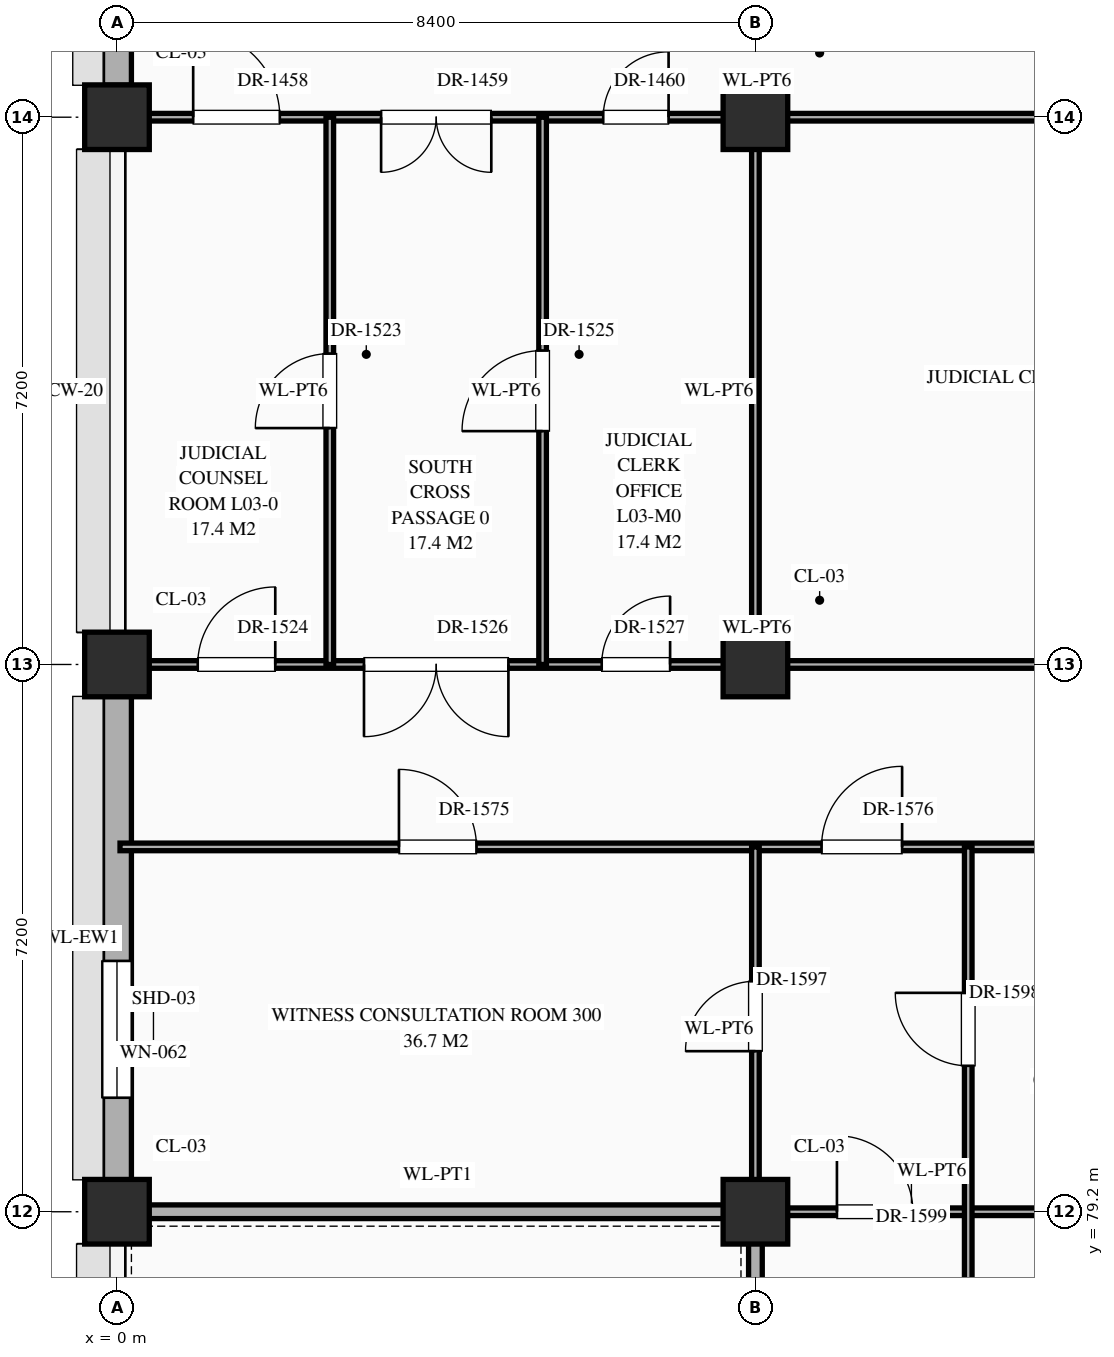
"""IFC4 building model, lengths in metres.
Left out: names, types, materials, properties, quantities, classifications, styles, units other than length and angle.
Written with IfcOpenShell. Run it as: python <this file> out.ifc"""

import sys

from ifc_helpers import new_model, si_unit, direction, frame, frame_2d, origin, origin_2d, place, context, subcontext, project, spatial, rectangle, extrude, element, fill, save


model = new_model("IFC4")
c1 = context("Model", 3, precision=1e-05, world=origin(), true_north=direction((0.0, 1.0)))
c2 = subcontext(c1, "Body", "Model", "MODEL_VIEW")
j1 = project(units=[si_unit("LENGTHUNIT", "METRE"), si_unit("PLANEANGLEUNIT", "RADIAN")], contexts=[c1])
p1 = place(None, origin())
s1 = spatial("IfcSite", under=j1, at=p1, CompositionType="ELEMENT")
p2 = place(p1, origin())
s2 = spatial("IfcBuilding", under=s1, at=p2, CompositionType="ELEMENT")
p3 = place(p2, frame((0.0, 0.0, 10.8)))
s3 = spatial("IfcBuildingStorey", under=s2, at=p3, CompositionType="ELEMENT", Elevation=10.8)
for number, where, z_axis, x_axis in (
    (1, (0.0, 79.2, 0.0), (0.0, 0.0, 1.0), (1.0, 0.0, 0.0)),
    (2, (0.0, 86.4, 0.0), (0.0, 0.0, 1.0), (1.0, 0.0, 0.0)),
    (3, (0.0, 93.6, 0.0), (0.0, 0.0, 1.0), (1.0, 0.0, 0.0)),
    (4, (8.4, 79.2, 0.0), (0.0, 0.0, 1.0), (1.0, 0.0, 0.0)),
    (5, (8.4, 86.4, 0.0), (0.0, 0.0, 1.0), (1.0, 0.0, 0.0)),
    (6, (8.4, 93.6, 0.0), (0.0, 0.0, 1.0), (1.0, 0.0, 0.0)),
):
    element("IfcColumn", number, at=place(p3, frame(where, z_axis=z_axis, x_axis=x_axis)), inside=s3, PredefinedType="COLUMN", context=c2, shape_type="SweptSolid", body=[
        extrude(rectangle(XDim=0.85, YDim=0.85, at=origin_2d()), origin(), (0.0, 0.0, 1.0), 5.4),
    ])
p4 = place(p3, frame((0.0, 79.62, 0.0), z_axis=(0.0, 0.0, 1.0), x_axis=(0.0, 1.0, 0.0)))
e7 = element("IfcWall", 7, at=p4, inside=s3, PredefinedType="STANDARD", context=c2, shape_type="SweptSolid", body=[
    extrude(rectangle(XDim=6.36, YDim=0.38, at=frame_2d((3.18, 0.0))), origin(), (0.0, 0.0, 1.0), 4.47),
])
p5 = place(p4, frame((1.08, 0.0, 0.85)))
e8 = element("IfcOpeningElement", 8, at=p5, cuts=e7, PredefinedType="OPENING", context=c2, shape_type="SweptSolid", body=[
    extrude(rectangle(XDim=1.8, YDim=1.2, at=frame_2d((0.9, 0.6))), frame((0.0, 0.202, 0.0), z_axis=(0.0, -1.0, 0.0), x_axis=(1.0, 0.0, 0.0)), (0.0, 0.0, 1.0), 0.404),
])
p6 = place(p3, frame((0.0, 94.02, 0.0), z_axis=(0.0, 0.0, 1.0), x_axis=(0.0, 1.0, 0.0)))
e9 = element("IfcWall", 9, at=p6, inside=s3, PredefinedType="STANDARD", context=c2, shape_type="SweptSolid", body=[
    extrude(rectangle(XDim=6.36, YDim=0.38, at=frame_2d((3.18, 0.0))), origin(), (0.0, 0.0, 1.0), 4.47),
])
p7 = place(p6, frame((4.03, 0.0, 0.85)))
e10 = element("IfcOpeningElement", 10, at=p7, cuts=e9, PredefinedType="OPENING", context=c2, shape_type="SweptSolid", body=[
    extrude(rectangle(XDim=0.9, YDim=1.56, at=frame_2d((0.45, 0.78))), frame((0.0, 0.202, 0.0), z_axis=(0.0, -1.0, 0.0), x_axis=(1.0, 0.0, 0.0)), (0.0, 0.0, 1.0), 0.404),
])
p8 = place(p3, frame((0.04, 79.2, 0.0), z_axis=(0.0, 0.0, 1.0), x_axis=(1.0, 0.0, 0.0)))
e11 = element("IfcWall", 11, at=p8, inside=s3, PredefinedType="STANDARD", context=c2, shape_type="SweptSolid", body=[
    extrude(rectangle(XDim=8.36, YDim=0.18, at=frame_2d((4.18, 0.0))), origin(), (0.0, 0.0, 1.0), 4.27),
])
p9 = place(p3, frame((8.4, 79.2, 0.0), z_axis=(0.0, 0.0, 1.0), x_axis=(1.0, 0.0, 0.0)))
e12 = element("IfcWall", 12, at=p9, inside=s3, PredefinedType="STANDARD", context=c2, shape_type="SweptSolid", body=[
    extrude(rectangle(XDim=8.36, YDim=0.1, at=frame_2d((4.18, 0.0))), origin(), (0.0, 0.0, 1.0), 4.27),
])
p10 = place(p9, frame((1.073, 0.0, 0.0)))
e13 = element("IfcOpeningElement", 13, at=p10, cuts=e12, PredefinedType="OPENING", context=c2, shape_type="SweptSolid", body=[
    extrude(rectangle(XDim=1.0, YDim=2.25, at=frame_2d((0.5, 1.125))), frame((0.0, 0.062, 0.0), z_axis=(0.0, -1.0, 0.0), x_axis=(1.0, 0.0, 0.0)), (0.0, 0.0, 1.0), 0.124),
])
p11 = place(p3, frame((0.04, 84.0, 0.0), z_axis=(0.0, 0.0, 1.0), x_axis=(1.0, 0.0, 0.0)))
e14 = element("IfcWall", 14, at=p11, inside=s3, PredefinedType="STANDARD", context=c2, shape_type="SweptSolid", body=[
    extrude(rectangle(XDim=33.56, YDim=0.1, at=frame_2d((16.78, 0.0))), origin(), (0.0, 0.0, 1.0), 5.12),
])
p12 = place(p11, frame((3.67, 0.0, 0.0)))
e15 = element("IfcOpeningElement", 15, at=p12, cuts=e14, PredefinedType="OPENING", context=c2, shape_type="SweptSolid", body=[
    extrude(rectangle(XDim=1.02, YDim=2.4, at=frame_2d((0.51, 1.2))), frame((0.0, 0.062, 0.0), z_axis=(0.0, -1.0, 0.0), x_axis=(1.0, 0.0, 0.0)), (0.0, 0.0, 1.0), 0.124),
])
p13 = place(p11, frame((9.23, 0.0, 0.0)))
e16 = element("IfcOpeningElement", 16, at=p13, cuts=e14, PredefinedType="OPENING", context=c2, shape_type="SweptSolid", body=[
    extrude(rectangle(XDim=1.06, YDim=2.4, at=frame_2d((0.53, 1.2))), frame((0.0, 0.062, 0.0), z_axis=(0.0, -1.0, 0.0), x_axis=(1.0, 0.0, 0.0)), (0.0, 0.0, 1.0), 0.124),
])
p14 = place(p11, frame((13.39, 0.0, 0.0)))
e17 = element("IfcOpeningElement", 17, at=p14, cuts=e14, PredefinedType="OPENING", context=c2, shape_type="SweptSolid", body=[
    extrude(rectangle(XDim=1.14, YDim=2.4, at=frame_2d((0.57, 1.2))), frame((0.0, 0.062, 0.0), z_axis=(0.0, -1.0, 0.0), x_axis=(1.0, 0.0, 0.0)), (0.0, 0.0, 1.0), 0.124),
])
p15 = place(p11, frame((20.51, 0.0, 0.0)))
e18 = element("IfcOpeningElement", 18, at=p15, cuts=e14, PredefinedType="OPENING", context=c2, shape_type="SweptSolid", body=[
    extrude(rectangle(XDim=0.9, YDim=2.15, at=frame_2d((0.45, 1.075))), frame((0.0, 0.062, 0.0), z_axis=(0.0, -1.0, 0.0), x_axis=(1.0, 0.0, 0.0)), (0.0, 0.0, 1.0), 0.124),
])
p16 = place(p11, frame((28.93, 0.0, 0.0)))
e19 = element("IfcOpeningElement", 19, at=p16, cuts=e14, PredefinedType="OPENING", context=c2, shape_type="SweptSolid", body=[
    extrude(rectangle(XDim=0.86, YDim=2.1, at=frame_2d((0.43, 1.05))), frame((0.0, 0.062, 0.0), z_axis=(0.0, -1.0, 0.0), x_axis=(1.0, 0.0, 0.0)), (0.0, 0.0, 1.0), 0.124),
])
p17 = place(p3, frame((0.04, 86.4, 0.0), z_axis=(0.0, 0.0, 1.0), x_axis=(1.0, 0.0, 0.0)))
e20 = element("IfcWall", 20, at=p17, inside=s3, PredefinedType="STANDARD", context=c2, shape_type="SweptSolid", body=[
    extrude(rectangle(XDim=16.76, YDim=0.1, at=frame_2d((8.38, 0.0))), origin(), (0.0, 0.0, 1.0), 4.27),
])
p18 = place(p17, frame((1.022, 0.0, 0.0)))
e21 = element("IfcOpeningElement", 21, at=p18, cuts=e20, PredefinedType="OPENING", context=c2, shape_type="SweptSolid", body=[
    extrude(rectangle(XDim=1.02, YDim=2.4, at=frame_2d((0.51, 1.2))), frame((0.0, 0.062, 0.0), z_axis=(0.0, -1.0, 0.0), x_axis=(1.0, 0.0, 0.0)), (0.0, 0.0, 1.0), 0.124),
])
p19 = place(p17, frame((3.21, 0.0, 0.0)))
e22 = element("IfcOpeningElement", 22, at=p19, cuts=e20, PredefinedType="OPENING", context=c2, shape_type="SweptSolid", body=[
    extrude(rectangle(XDim=1.9, YDim=2.5, at=frame_2d((0.95, 1.25))), frame((0.0, 0.062, 0.0), z_axis=(0.0, -1.0, 0.0), x_axis=(1.0, 0.0, 0.0)), (0.0, 0.0, 1.0), 0.124),
])
p20 = place(p17, frame((6.337, 0.0, 0.0)))
e23 = element("IfcOpeningElement", 23, at=p20, cuts=e20, PredefinedType="OPENING", context=c2, shape_type="SweptSolid", body=[
    extrude(rectangle(XDim=0.9, YDim=2.15, at=frame_2d((0.45, 1.075))), frame((0.0, 0.062, 0.0), z_axis=(0.0, -1.0, 0.0), x_axis=(1.0, 0.0, 0.0)), (0.0, 0.0, 1.0), 0.124),
])
p21 = place(p17, frame((12.13, 0.0, 0.0)))
e24 = element("IfcOpeningElement", 24, at=p21, cuts=e20, PredefinedType="OPENING", context=c2, shape_type="SweptSolid", body=[
    extrude(rectangle(XDim=0.86, YDim=2.1, at=frame_2d((0.43, 1.05))), frame((0.0, 0.062, 0.0), z_axis=(0.0, -1.0, 0.0), x_axis=(1.0, 0.0, 0.0)), (0.0, 0.0, 1.0), 0.124),
])
p22 = place(p3, frame((0.04, 93.6, 0.0), z_axis=(0.0, 0.0, 1.0), x_axis=(1.0, 0.0, 0.0)))
e25 = element("IfcWall", 25, at=p22, inside=s3, PredefinedType="STANDARD", context=c2, shape_type="SweptSolid", body=[
    extrude(rectangle(XDim=16.76, YDim=0.1, at=frame_2d((8.38, 0.0))), origin(), (0.0, 0.0, 1.0), 4.27),
])
p23 = place(p22, frame((0.962, 0.0, 0.0)))
e26 = element("IfcOpeningElement", 26, at=p23, cuts=e25, PredefinedType="OPENING", context=c2, shape_type="SweptSolid", body=[
    extrude(rectangle(XDim=1.14, YDim=2.4, at=frame_2d((0.57, 1.2))), frame((0.0, 0.062, 0.0), z_axis=(0.0, -1.0, 0.0), x_axis=(1.0, 0.0, 0.0)), (0.0, 0.0, 1.0), 0.124),
])
p24 = place(p22, frame((3.435, 0.0, 0.0)))
e27 = element("IfcOpeningElement", 27, at=p24, cuts=e25, PredefinedType="OPENING", context=c2, shape_type="SweptSolid", body=[
    extrude(rectangle(XDim=1.45, YDim=2.3, at=frame_2d((0.725, 1.15))), frame((0.0, 0.062, 0.0), z_axis=(0.0, -1.0, 0.0), x_axis=(1.0, 0.0, 0.0)), (0.0, 0.0, 1.0), 0.124),
])
p25 = place(p22, frame((6.357, 0.0, 0.0)))
e28 = element("IfcOpeningElement", 28, at=p25, cuts=e25, PredefinedType="OPENING", context=c2, shape_type="SweptSolid", body=[
    extrude(rectangle(XDim=0.86, YDim=2.1, at=frame_2d((0.43, 1.05))), frame((0.0, 0.062, 0.0), z_axis=(0.0, -1.0, 0.0), x_axis=(1.0, 0.0, 0.0)), (0.0, 0.0, 1.0), 0.124),
])
p26 = place(p22, frame((12.1, 0.0, 0.0)))
e29 = element("IfcOpeningElement", 29, at=p26, cuts=e25, PredefinedType="OPENING", context=c2, shape_type="SweptSolid", body=[
    extrude(rectangle(XDim=0.92, YDim=2.15, at=frame_2d((0.46, 1.075))), frame((0.0, 0.062, 0.0), z_axis=(0.0, -1.0, 0.0), x_axis=(1.0, 0.0, 0.0)), (0.0, 0.0, 1.0), 0.124),
])
p27 = place(p3, frame((2.8, 86.4, 0.0), z_axis=(0.0, 0.0, 1.0), x_axis=(0.0, 1.0, 0.0)))
e30 = element("IfcWall", 30, at=p27, inside=s3, PredefinedType="STANDARD", context=c2, shape_type="SweptSolid", body=[
    extrude(rectangle(XDim=7.2, YDim=0.1, at=frame_2d((3.6, 0.0))), origin(), (0.0, 0.0, 1.0), 5.12),
])
p28 = place(p27, frame((3.11, 0.0, 0.0)))
e31 = element("IfcOpeningElement", 31, at=p28, cuts=e30, PredefinedType="OPENING", context=c2, shape_type="SweptSolid", body=[
    extrude(rectangle(XDim=0.98, YDim=2.35, at=frame_2d((0.49, 1.175))), frame((0.0, 0.062, 0.0), z_axis=(0.0, -1.0, 0.0), x_axis=(1.0, 0.0, 0.0)), (0.0, 0.0, 1.0), 0.124),
])
p29 = place(p3, frame((5.6, 86.4, 0.0), z_axis=(0.0, 0.0, 1.0), x_axis=(0.0, 1.0, 0.0)))
e32 = element("IfcWall", 32, at=p29, inside=s3, PredefinedType="STANDARD", context=c2, shape_type="SweptSolid", body=[
    extrude(rectangle(XDim=7.2, YDim=0.1, at=frame_2d((3.6, 0.0))), origin(), (0.0, 0.0, 1.0), 5.12),
])
p30 = place(p29, frame((3.07, 0.0, 0.0)))
e33 = element("IfcOpeningElement", 33, at=p30, cuts=e32, PredefinedType="OPENING", context=c2, shape_type="SweptSolid", body=[
    extrude(rectangle(XDim=1.06, YDim=2.4, at=frame_2d((0.53, 1.2))), frame((0.0, 0.062, 0.0), z_axis=(0.0, -1.0, 0.0), x_axis=(1.0, 0.0, 0.0)), (0.0, 0.0, 1.0), 0.124),
])
p31 = place(p3, frame((8.4, 64.8, 0.0), z_axis=(0.0, 0.0, 1.0), x_axis=(0.0, 1.0, 0.0)))
e34 = element("IfcWall", 34, at=p31, inside=s3, PredefinedType="STANDARD", context=c2, shape_type="SweptSolid", body=[
    extrude(rectangle(XDim=14.4, YDim=0.18, at=frame_2d((7.2, 0.0))), origin(), (0.0, 0.0, 1.0), 5.12),
])
p32 = place(p31, frame((6.077, 0.0, 0.0)))
e35 = element("IfcOpeningElement", 35, at=p32, cuts=e34, PredefinedType="OPENING", context=c2, shape_type="SweptSolid", body=[
    extrude(rectangle(XDim=1.9, YDim=2.5, at=frame_2d((0.95, 1.25))), frame((0.0, 0.102, 0.0), z_axis=(0.0, -1.0, 0.0), x_axis=(1.0, 0.0, 0.0)), (0.0, 0.0, 1.0), 0.204),
])
p33 = place(p3, frame((8.4, 79.2, 0.0), z_axis=(0.0, 0.0, 1.0), x_axis=(0.0, 1.0, 0.0)))
e36 = element("IfcWall", 36, at=p33, inside=s3, PredefinedType="STANDARD", context=c2, shape_type="SweptSolid", body=[
    extrude(rectangle(XDim=4.8, YDim=0.1, at=frame_2d((2.4, 0.0))), origin(), (0.0, 0.0, 1.0), 4.37),
])
p34 = place(p33, frame((2.113, 0.0, 0.0)))
e37 = element("IfcOpeningElement", 37, at=p34, cuts=e36, PredefinedType="OPENING", context=c2, shape_type="SweptSolid", body=[
    extrude(rectangle(XDim=0.92, YDim=2.15, at=frame_2d((0.46, 1.075))), frame((0.0, 0.062, 0.0), z_axis=(0.0, -1.0, 0.0), x_axis=(1.0, 0.0, 0.0)), (0.0, 0.0, 1.0), 0.124),
])
p35 = place(p3, frame((8.4, 86.4, 0.0), z_axis=(0.0, 0.0, 1.0), x_axis=(0.0, 1.0, 0.0)))
e38 = element("IfcWall", 38, at=p35, inside=s3, PredefinedType="STANDARD", context=c2, shape_type="SweptSolid", body=[
    extrude(rectangle(XDim=7.2, YDim=0.1, at=frame_2d((3.6, 0.0))), origin(), (0.0, 0.0, 1.0), 4.37),
])
p36 = place(p3, frame((11.2, 64.8, 0.0), z_axis=(0.0, 0.0, 1.0), x_axis=(0.0, 1.0, 0.0)))
e39 = element("IfcWall", 39, at=p36, inside=s3, PredefinedType="STANDARD", context=c2, shape_type="SweptSolid", body=[
    extrude(rectangle(XDim=19.2, YDim=0.1, at=frame_2d((9.6, 0.0))), origin(), (0.0, 0.0, 1.0), 5.12),
])
p37 = place(p36, frame((16.32, 0.0, 0.0)))
e40 = element("IfcOpeningElement", 40, at=p37, cuts=e39, PredefinedType="OPENING", context=c2, shape_type="SweptSolid", body=[
    extrude(rectangle(XDim=0.96, YDim=2.2, at=frame_2d((0.48, 1.1))), frame((0.0, 0.062, 0.0), z_axis=(0.0, -1.0, 0.0), x_axis=(1.0, 0.0, 0.0)), (0.0, 0.0, 1.0), 0.124),
])
p38 = place(p36, frame((0.73, 0.0, 0.0)))
e41 = element("IfcOpeningElement", 41, at=p38, cuts=e39, PredefinedType="OPENING", context=c2, shape_type="SweptSolid", body=[
    extrude(rectangle(XDim=0.94, YDim=2.3, at=frame_2d((0.47, 1.15))), frame((0.0, 0.062, 0.0), z_axis=(0.0, -1.0, 0.0), x_axis=(1.0, 0.0, 0.0)), (0.0, 0.0, 1.0), 0.124),
])
p39 = place(p36, frame((4.31, 0.0, 0.0)))
e42 = element("IfcOpeningElement", 42, at=p39, cuts=e39, PredefinedType="OPENING", context=c2, shape_type="SweptSolid", body=[
    extrude(rectangle(XDim=0.98, YDim=2.35, at=frame_2d((0.49, 1.175))), frame((0.0, 0.062, 0.0), z_axis=(0.0, -1.0, 0.0), x_axis=(1.0, 0.0, 0.0)), (0.0, 0.0, 1.0), 0.124),
])
p40 = place(p36, frame((10.29, 0.0, 0.0)))
e43 = element("IfcOpeningElement", 43, at=p40, cuts=e39, PredefinedType="OPENING", context=c2, shape_type="SweptSolid", body=[
    extrude(rectangle(XDim=1.02, YDim=2.4, at=frame_2d((0.51, 1.2))), frame((0.0, 0.062, 0.0), z_axis=(0.0, -1.0, 0.0), x_axis=(1.0, 0.0, 0.0)), (0.0, 0.0, 1.0), 0.124),
])
p41 = place(p5, origin())
e44 = element("IfcWindow", 44, at=p41, inside=s3, PartitioningType="SINGLE_PANEL", PredefinedType="WINDOW", context=c2, shape_type="SweptSolid", body=[
    extrude(rectangle(XDim=1.8, YDim=1.2, at=frame_2d((0.9, 0.6))), frame((0.0, 0.03, 0.0), z_axis=(0.0, -1.0, 0.0), x_axis=(1.0, 0.0, 0.0)), (0.0, 0.0, 1.0), 0.06),
])
fill(e8, e44)
p42 = place(p23, origin())
e45 = element("IfcDoor", 45, at=p42, inside=s3, OperationType="SINGLE_SWING_LEFT", PredefinedType="DOOR", context=c2, shape_type="SweptSolid", body=[
    extrude(rectangle(XDim=1.14, YDim=2.4, at=frame_2d((0.57, 1.2))), frame((0.0, 0.025, 0.0), z_axis=(0.0, -1.0, 0.0), x_axis=(1.0, 0.0, 0.0)), (0.0, 0.0, 1.0), 0.05),
])
fill(e26, e45)
p43 = place(p24, frame((1.45, 0.0, 0.0), z_axis=(0.0, 0.0, 1.0), x_axis=(-1.0, 0.0, 0.0)))
e46 = element("IfcDoor", 46, at=p43, inside=s3, OperationType="DOUBLE_DOOR_SINGLE_SWING", PredefinedType="DOOR", context=c2, shape_type="SweptSolid", body=[
    extrude(rectangle(XDim=1.45, YDim=2.3, at=frame_2d((0.725, 1.15))), frame((0.0, 0.025, 0.0), z_axis=(0.0, -1.0, 0.0), x_axis=(1.0, 0.0, 0.0)), (0.0, 0.0, 1.0), 0.05),
])
fill(e27, e46)
p44 = place(p25, origin())
e47 = element("IfcDoor", 47, at=p44, inside=s3, OperationType="SINGLE_SWING_RIGHT", PredefinedType="DOOR", context=c2, shape_type="SweptSolid", body=[
    extrude(rectangle(XDim=0.86, YDim=2.1, at=frame_2d((0.43, 1.05))), frame((0.0, 0.025, 0.0), z_axis=(0.0, -1.0, 0.0), x_axis=(1.0, 0.0, 0.0)), (0.0, 0.0, 1.0), 0.05),
])
fill(e28, e47)
p45 = place(p28, origin())
e48 = element("IfcDoor", 48, at=p45, inside=s3, OperationType="SINGLE_SWING_LEFT", PredefinedType="DOOR", context=c2, shape_type="SweptSolid", body=[
    extrude(rectangle(XDim=0.98, YDim=2.35, at=frame_2d((0.49, 1.175))), frame((0.0, 0.025, 0.0), z_axis=(0.0, -1.0, 0.0), x_axis=(1.0, 0.0, 0.0)), (0.0, 0.0, 1.0), 0.05),
])
fill(e31, e48)
p46 = place(p18, origin())
e49 = element("IfcDoor", 49, at=p46, inside=s3, OperationType="SINGLE_SWING_RIGHT", PredefinedType="DOOR", context=c2, shape_type="SweptSolid", body=[
    extrude(rectangle(XDim=1.02, YDim=2.4, at=frame_2d((0.51, 1.2))), frame((0.0, 0.025, 0.0), z_axis=(0.0, -1.0, 0.0), x_axis=(1.0, 0.0, 0.0)), (0.0, 0.0, 1.0), 0.05),
])
fill(e21, e49)
p47 = place(p30, origin())
e50 = element("IfcDoor", 50, at=p47, inside=s3, OperationType="SINGLE_SWING_LEFT", PredefinedType="DOOR", context=c2, shape_type="SweptSolid", body=[
    extrude(rectangle(XDim=1.06, YDim=2.4, at=frame_2d((0.53, 1.2))), frame((0.0, 0.025, 0.0), z_axis=(0.0, -1.0, 0.0), x_axis=(1.0, 0.0, 0.0)), (0.0, 0.0, 1.0), 0.05),
])
fill(e33, e50)
p48 = place(p19, frame((1.9, 0.0, 0.0), z_axis=(0.0, 0.0, 1.0), x_axis=(-1.0, 0.0, 0.0)))
e51 = element("IfcDoor", 51, at=p48, inside=s3, OperationType="DOUBLE_DOOR_SINGLE_SWING", PredefinedType="DOOR", context=c2, shape_type="SweptSolid", body=[
    extrude(rectangle(XDim=1.9, YDim=2.5, at=frame_2d((0.95, 1.25))), frame((0.0, 0.025, 0.0), z_axis=(0.0, -1.0, 0.0), x_axis=(1.0, 0.0, 0.0)), (0.0, 0.0, 1.0), 0.05),
])
fill(e22, e51)
p49 = place(p20, origin())
e52 = element("IfcDoor", 52, at=p49, inside=s3, OperationType="SINGLE_SWING_RIGHT", PredefinedType="DOOR", context=c2, shape_type="SweptSolid", body=[
    extrude(rectangle(XDim=0.9, YDim=2.15, at=frame_2d((0.45, 1.075))), frame((0.0, 0.025, 0.0), z_axis=(0.0, -1.0, 0.0), x_axis=(1.0, 0.0, 0.0)), (0.0, 0.0, 1.0), 0.05),
])
fill(e23, e52)
p50 = place(p12, origin())
e53 = element("IfcDoor", 53, at=p50, inside=s3, OperationType="SINGLE_SWING_LEFT", PredefinedType="DOOR", context=c2, shape_type="SweptSolid", body=[
    extrude(rectangle(XDim=1.02, YDim=2.4, at=frame_2d((0.51, 1.2))), frame((0.0, 0.025, 0.0), z_axis=(0.0, -1.0, 0.0), x_axis=(1.0, 0.0, 0.0)), (0.0, 0.0, 1.0), 0.05),
])
fill(e15, e53)
p51 = place(p13, origin())
e54 = element("IfcDoor", 54, at=p51, inside=s3, OperationType="SINGLE_SWING_RIGHT", PredefinedType="DOOR", context=c2, shape_type="SweptSolid", body=[
    extrude(rectangle(XDim=1.06, YDim=2.4, at=frame_2d((0.53, 1.2))), frame((0.0, 0.025, 0.0), z_axis=(0.0, -1.0, 0.0), x_axis=(1.0, 0.0, 0.0)), (0.0, 0.0, 1.0), 0.05),
])
fill(e16, e54)
p52 = place(p34, origin())
e55 = element("IfcDoor", 55, at=p52, inside=s3, OperationType="SINGLE_SWING_LEFT", PredefinedType="DOOR", context=c2, shape_type="SweptSolid", body=[
    extrude(rectangle(XDim=0.92, YDim=2.15, at=frame_2d((0.46, 1.075))), frame((0.0, 0.025, 0.0), z_axis=(0.0, -1.0, 0.0), x_axis=(1.0, 0.0, 0.0)), (0.0, 0.0, 1.0), 0.05),
])
fill(e37, e55)
p53 = place(p37, origin())
e56 = element("IfcDoor", 56, at=p53, inside=s3, OperationType="SINGLE_SWING_RIGHT", PredefinedType="DOOR", context=c2, shape_type="SweptSolid", body=[
    extrude(rectangle(XDim=0.96, YDim=2.2, at=frame_2d((0.48, 1.1))), frame((0.0, 0.025, 0.0), z_axis=(0.0, -1.0, 0.0), x_axis=(1.0, 0.0, 0.0)), (0.0, 0.0, 1.0), 0.05),
])
fill(e40, e56)
p54 = place(p10, origin())
e57 = element("IfcDoor", 57, at=p54, inside=s3, OperationType="SINGLE_SWING_LEFT", PredefinedType="DOOR", context=c2, shape_type="SweptSolid", body=[
    extrude(rectangle(XDim=1.0, YDim=2.25, at=frame_2d((0.5, 1.125))), frame((0.0, 0.025, 0.0), z_axis=(0.0, -1.0, 0.0), x_axis=(1.0, 0.0, 0.0)), (0.0, 0.0, 1.0), 0.05),
])
fill(e13, e57)
save(model, sys.argv[1])
